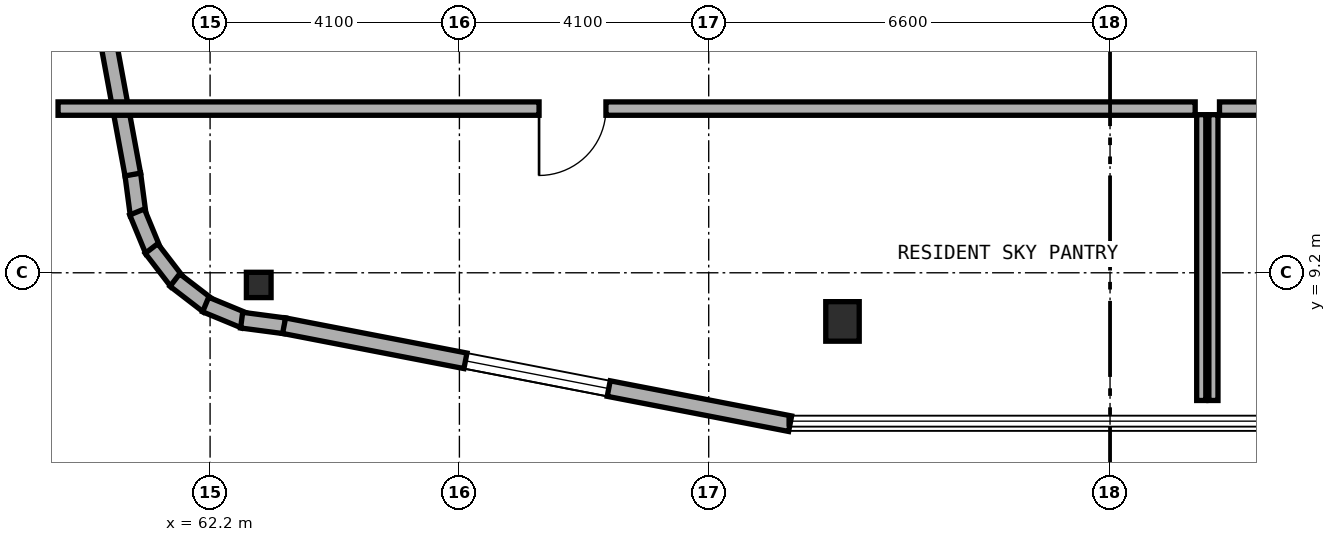
"""IFC4 building model, lengths in metres.
Left out: names, types, materials, properties, quantities, classifications, styles, units other than length and angle.
Written with IfcOpenShell. Run it as: python <this file> out.ifc"""

import sys

from ifc_helpers import new_model, si_unit, direction, frame, frame_2d, origin, origin_2d, place, context, subcontext, project, spatial, rectangle, i_section, extrude, element, fill, save


model = new_model("IFC4")
c1 = context("Model", 3, precision=1e-05, world=origin(), true_north=direction((0.0, 1.0)))
c2 = subcontext(c1, "Body", "Model", "MODEL_VIEW")
j1 = project(units=[si_unit("LENGTHUNIT", "METRE"), si_unit("PLANEANGLEUNIT", "RADIAN")], contexts=[c1])
p1 = place(None, origin())
s1 = spatial("IfcSite", under=j1, at=p1, CompositionType="ELEMENT")
p2 = place(p1, origin())
s2 = spatial("IfcBuilding", under=s1, at=p2, CompositionType="ELEMENT")
p3 = place(p2, frame((0.0, 0.0, 119.5)))
s3 = spatial("IfcBuildingStorey", under=s2, at=p3, CompositionType="ELEMENT", Elevation=119.5)
p4 = place(p3, frame((72.6, 8.4, 0.0), z_axis=(0.0, 0.0, 1.0), x_axis=(1.0, 0.0, 0.0)))
e1 = element("IfcColumn", 1, at=p4, inside=s3, PredefinedType="COLUMN", context=c2, shape_type="SweptSolid", body=[
    extrude(rectangle(XDim=0.55, YDim=0.65, at=origin_2d()), origin(), (0.0, 0.0, 1.0), 4.5),
])
p5 = place(p3, frame((63.0, 9.0, 0.0), z_axis=(0.0, 0.0, 1.0), x_axis=(1.0, 0.0, 0.0)))
e2 = element("IfcColumn", 2, at=p5, inside=s3, PredefinedType="COLUMN", context=c2, shape_type="SweptSolid", body=[
    extrude(i_section(OverallWidth=0.406, OverallDepth=0.416, WebThickness=0.024, FlangeThickness=0.039, FilletRadius=0.015, at=origin_2d()), origin(), (0.0, 0.0, 1.0), 4.5),
])
p6 = place(p3, frame((60.928, 10.825, 0.0), z_axis=(0.0, 0.0, 1.0), x_axis=(0.131667498923, -0.991293937098, 0.0)))
e3 = element("IfcWall", 3, at=p6, inside=s3, PredefinedType="STANDARD", context=c2, shape_type="SweptSolid", body=[
    extrude(rectangle(XDim=0.677, YDim=0.26, at=frame_2d((0.338, 0.0))), origin(), (0.0, 0.0, 1.0), 4.25),
])
p7 = place(p3, frame((60.999, 10.2, 0.0), z_axis=(0.0, 0.0, 1.0), x_axis=(0.381988976935, -0.924166879681, 0.0)))
e4 = element("IfcWall", 4, at=p7, inside=s3, PredefinedType="STANDARD", context=c2, shape_type="SweptSolid", body=[
    extrude(rectangle(XDim=0.693, YDim=0.26, at=frame_2d((0.347, 0.0))), origin(), (0.0, 0.0, 1.0), 4.25),
])
for number, where, z_axis, x_axis in (
    (5, (61.236, 9.599, 0.0), (0.0, 0.0, 1.0), (0.609, -0.793, 0.0)),
    (6, (61.621, 9.08, 0.0), (0.0, 0.0, 1.0), (0.793, -0.61, 0.0)),
):
    element("IfcWall", number, at=place(p3, frame(where, z_axis=z_axis, x_axis=x_axis)), inside=s3, PredefinedType="STANDARD", context=c2, shape_type="SweptSolid", body=[
        extrude(rectangle(XDim=0.694, YDim=0.26, at=frame_2d((0.347, 0.0))), origin(), (0.0, 0.0, 1.0), 4.25),
    ])
p8 = place(p3, frame((62.127, 8.678, 0.0), z_axis=(0.0, 0.0, 1.0), x_axis=(0.92421822618, -0.381864727877, 0.0)))
e7 = element("IfcWall", 7, at=p8, inside=s3, PredefinedType="STANDARD", context=c2, shape_type="SweptSolid", body=[
    extrude(rectangle(XDim=0.694, YDim=0.26, at=frame_2d((0.347, 0.0))), origin(), (0.0, 0.0, 1.0), 4.25),
])
p9 = place(p3, frame((62.719, 8.421, 0.0), z_axis=(0.0, 0.0, 1.0), x_axis=(0.991433279471, -0.130614135366, 0.0)))
e8 = element("IfcWall", 8, at=p9, inside=s3, PredefinedType="STANDARD", context=c2, shape_type="SweptSolid", body=[
    extrude(rectangle(XDim=0.712, YDim=0.26, at=frame_2d((0.356, 0.0))), origin(), (0.0, 0.0, 1.0), 4.25),
])
p10 = place(p3, frame((63.417, 8.33, 0.0), z_axis=(0.0, 0.0, 1.0), x_axis=(0.981750199588, -0.190175039396, 0.0)))
e9 = element("IfcWall", 9, at=p10, inside=s3, PredefinedType="STANDARD", context=c2, shape_type="SweptSolid", body=[
    extrude(rectangle(XDim=8.477, YDim=0.26, at=frame_2d((4.238, 0.0))), origin(), (0.0, 0.0, 1.0), 4.25),
])
p11 = place(p10, frame((3.038, 0.0, 0.8)))
e10 = element("IfcOpeningElement", 10, at=p11, cuts=e9, PredefinedType="OPENING", context=c2, shape_type="SweptSolid", body=[
    extrude(rectangle(XDim=2.4, YDim=1.6, at=frame_2d((1.2, 0.8))), frame((0.0, 0.14, 0.0), z_axis=(0.0, -1.0, 0.0), x_axis=(1.0, 0.0, 0.0)), (0.0, 0.0, 1.0), 0.28),
])
p12 = place(p3, frame((59.318, 19.558, 0.0), z_axis=(0.0, 0.0, 1.0), x_axis=(0.181209963057, -0.983444431215, 0.0)))
e11 = element("IfcWall", 11, at=p12, inside=s3, PredefinedType="STANDARD", context=c2, shape_type="SweptSolid", body=[
    extrude(rectangle(XDim=8.889, YDim=0.26, at=frame_2d((4.445, 0.0))), origin(), (0.0, 0.0, 1.0), 4.25),
])
p13 = place(p12, frame((2.634, 0.0, 0.8)))
e12 = element("IfcOpeningElement", 12, at=p13, cuts=e11, PredefinedType="OPENING", context=c2, shape_type="SweptSolid", body=[
    extrude(rectangle(XDim=2.4, YDim=1.6, at=frame_2d((1.2, 0.8))), frame((0.0, 0.14, 0.0), z_axis=(0.0, -1.0, 0.0), x_axis=(1.0, 0.0, 0.0)), (0.0, 0.0, 1.0), 0.28),
])
p14 = place(p3, frame((78.5, 7.1, 0.0), z_axis=(0.0, 0.0, 1.0), x_axis=(0.0, 1.0, 0.0)))
e13 = element("IfcWall", 13, at=p14, inside=s3, PredefinedType="PARTITIONING", context=c2, shape_type="SweptSolid", body=[
    extrude(rectangle(XDim=4.7, YDim=0.15, at=frame_2d((2.35, 0.0))), origin(), (0.0, 0.0, 1.0), 3.945),
])
p15 = place(p3, frame((59.7, 11.9, 0.0), z_axis=(0.0, 0.0, 1.0), x_axis=(1.0, 0.0, 0.0)))
e14 = element("IfcWall", 14, at=p15, inside=s3, PredefinedType="SOLIDWALL", context=c2, shape_type="SweptSolid", body=[
    extrude(rectangle(XDim=18.7, YDim=0.22, at=frame_2d((9.35, 0.0))), origin(), (0.0, 0.0, 1.0), 3.825),
])
p16 = place(p15, frame((7.91, 0.0, 0.0)))
e15 = element("IfcOpeningElement", 15, at=p16, cuts=e14, PredefinedType="OPENING", context=c2, shape_type="SweptSolid", body=[
    extrude(rectangle(XDim=1.1, YDim=2.1, at=frame_2d((0.55, 1.05))), frame((0.0, 0.12, 0.0), z_axis=(0.0, -1.0, 0.0), x_axis=(1.0, 0.0, 0.0)), (0.0, 0.0, 1.0), 0.24),
])
p17 = place(p3, frame((78.7, 7.1, 0.0), z_axis=(0.0, 0.0, 1.0), x_axis=(0.0, 1.0, 0.0)))
e16 = element("IfcWall", 16, at=p17, inside=s3, PredefinedType="PARTITIONING", context=c2, shape_type="SweptSolid", body=[
    extrude(rectangle(XDim=4.7, YDim=0.15, at=frame_2d((2.35, 0.0))), origin(), (0.0, 0.0, 1.0), 3.945),
])
p18 = place(p3, frame((78.8, 11.9, 0.0), z_axis=(0.0, 0.0, 1.0), x_axis=(1.0, 0.0, 0.0)))
e17 = element("IfcWall", 17, at=p18, inside=s3, PredefinedType="SOLIDWALL", context=c2, shape_type="SweptSolid", body=[
    extrude(rectangle(XDim=4.3, YDim=0.22, at=frame_2d((2.15, 0.0))), origin(), (0.0, 0.0, 1.0), 3.825),
])
p19 = place(p18, frame((1.43, 0.0, 0.0)))
e18 = element("IfcOpeningElement", 18, at=p19, cuts=e17, PredefinedType="OPENING", context=c2, shape_type="SweptSolid", body=[
    extrude(rectangle(XDim=1.1, YDim=2.1, at=frame_2d((0.55, 1.05))), frame((0.0, 0.12, 0.0), z_axis=(0.0, -1.0, 0.0), x_axis=(1.0, 0.0, 0.0)), (0.0, 0.0, 1.0), 0.24),
])
p20 = place(p11, origin())
e19 = element("IfcWindow", 19, at=p20, inside=s3, PartitioningType="SINGLE_PANEL", PredefinedType="WINDOW", context=c2, shape_type="SweptSolid", body=[
    extrude(rectangle(XDim=2.4, YDim=1.6, at=frame_2d((1.2, 0.8))), frame((0.0, 0.03, 0.0), z_axis=(0.0, -1.0, 0.0), x_axis=(1.0, 0.0, 0.0)), (0.0, 0.0, 1.0), 0.06),
])
fill(e10, e19)
p21 = place(p16, frame((1.1, 0.0, 0.0), z_axis=(0.0, 0.0, 1.0), x_axis=(-1.0, 0.0, 0.0)))
e20 = element("IfcDoor", 20, at=p21, inside=s3, OperationType="SINGLE_SWING_RIGHT", PredefinedType="DOOR", context=c2, shape_type="SweptSolid", body=[
    extrude(rectangle(XDim=1.1, YDim=2.1, at=frame_2d((0.55, 1.05))), frame((0.0, 0.025, 0.0), z_axis=(0.0, -1.0, 0.0), x_axis=(1.0, 0.0, 0.0)), (0.0, 0.0, 1.0), 0.05),
])
fill(e15, e20)
save(model, sys.argv[1])
